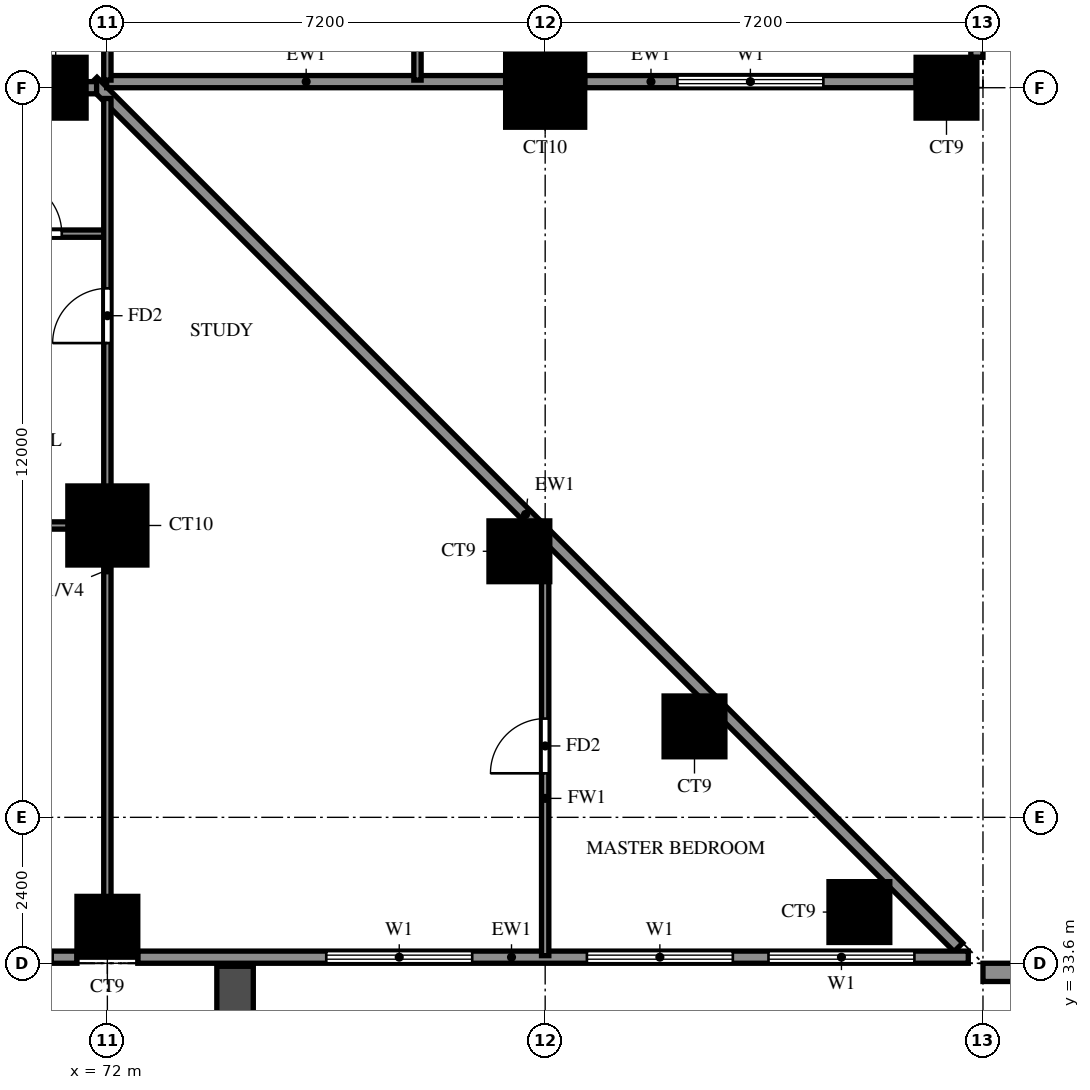
"""IFC4 building model, lengths in metres.
Left out: names, types, materials, properties, quantities, classifications, styles, units other than length and angle.
Written with IfcOpenShell. Run it as: python <this file> out.ifc"""

import sys

from ifc_helpers import new_model, si_unit, direction, frame, frame_2d, origin, origin_2d, place, context, subcontext, project, spatial, rectangle, extrude, source, transform, mapped, element, fill, save


model = new_model("IFC4")
c1 = context("Model", 3, precision=1e-05, world=origin(), true_north=direction((0.0, 1.0)))
c2 = subcontext(c1, "Body", "Model", "MODEL_VIEW")
j1 = project(units=[si_unit("LENGTHUNIT", "METRE"), si_unit("PLANEANGLEUNIT", "RADIAN")], contexts=[c1])
p1 = place(None, origin())
s1 = spatial("IfcSite", under=j1, at=p1, CompositionType="ELEMENT")
p2 = place(p1, origin())
s2 = spatial("IfcBuilding", under=s1, at=p2, CompositionType="ELEMENT")
p3 = place(p2, frame((0.0, 0.0, 69.0)))
s3 = spatial("IfcBuildingStorey", under=s2, at=p3, CompositionType="ELEMENT", Elevation=69.0)
m1 = source(origin(), c2, "Body", "SweptSolid", [
    extrude(rectangle(XDim=1.0, YDim=1.0, at=origin_2d()), origin(), (0.0, 0.0, 1.0), 3.18),
])
for number, where, z_axis, x_axis in (
    (1, (72.0, 34.2, 0.0), (0.0, 0.0, 1.0), (1.0, 0.0, 0.0)),
    (2, (84.367, 34.442, 0.0), (0.0, 0.0, 1.0), (1.0, 0.0, 0.0)),
    (3, (81.656, 37.496, 0.0), (0.0, 0.0, 1.0), (1.0, 0.0, 0.0)),
    (4, (78.776, 40.376, 0.0), (0.0, 0.0, 1.0), (1.0, 0.0, 0.0)),
):
    element("IfcColumn", number, at=place(p3, frame(where, z_axis=z_axis, x_axis=x_axis)), inside=s3, PredefinedType="COLUMN", context=c2, shape_type="MappedRepresentation", body=[
        mapped(m1, transform((0.0, 0.0, 0.0))),
    ])
m2 = source(origin(), c2, "Body", "SweptSolid", [
    extrude(rectangle(XDim=1.3, YDim=1.3, at=origin_2d()), origin(), (0.0, 0.0, 1.0), 3.18),
])
p4 = place(p3, frame((72.0, 40.8, 0.0), z_axis=(0.0, 0.0, 1.0), x_axis=(1.0, 0.0, 0.0)))
e5 = element("IfcColumn", 5, at=p4, inside=s3, PredefinedType="COLUMN", context=c2, shape_type="MappedRepresentation", body=[
    mapped(m2, transform((0.0, 0.0, 0.0))),
])
p5 = place(p3, frame((71.15, 48.0, 0.0), z_axis=(0.0, 0.0, 1.0), x_axis=(1.0, 0.0, 0.0)))
e6 = element("IfcColumn", 6, at=p5, inside=s3, PredefinedType="COLUMN", context=c2, shape_type="MappedRepresentation", body=[
    mapped(m1, transform((0.0, 0.0, 0.0))),
])
p6 = place(p3, frame((79.2, 48.0, 0.0), z_axis=(0.0, 0.0, 1.0), x_axis=(1.0, 0.0, 0.0)))
e7 = element("IfcColumn", 7, at=p6, inside=s3, PredefinedType="COLUMN", context=c2, shape_type="MappedRepresentation", body=[
    mapped(m2, transform((0.0, 0.0, 0.0))),
])
p7 = place(p3, frame((85.8, 48.0, 0.0), z_axis=(0.0, 0.0, 1.0), x_axis=(1.0, 0.0, 0.0)))
e8 = element("IfcColumn", 8, at=p7, inside=s3, PredefinedType="COLUMN", context=c2, shape_type="MappedRepresentation", body=[
    mapped(m1, transform((0.0, 0.0, 0.0))),
])
p8 = place(p3, frame((85.996, 33.863, 0.0), z_axis=(0.0, 0.0, 1.0), x_axis=(-0.707100718496, 0.707112843825, 0.0)))
e9 = element("IfcWall", 9, at=p8, inside=s3, PredefinedType="SOLIDWALL", context=c2, shape_type="SweptSolid", body=[
    extrude(rectangle(XDim=20.135, YDim=0.2, at=frame_2d((10.067, 0.0))), origin(), (0.0, 0.0, 1.0), 3.18),
])
p9 = place(p3, frame((71.989, 48.1, 0.0), z_axis=(0.0, 0.0, 1.0), x_axis=(1.0, 0.0, 0.0)))
e10 = element("IfcWall", 10, at=p9, inside=s3, PredefinedType="SOLIDWALL", context=c2, shape_type="SweptSolid", body=[
    extrude(rectangle(XDim=6.562, YDim=0.2, at=frame_2d((3.281, 0.0))), origin(), (0.0, 0.0, 1.0), 3.18),
])
p10 = place(p3, frame((79.85, 48.1, 0.0), z_axis=(0.0, 0.0, 1.0), x_axis=(1.0, 0.0, 0.0)))
e11 = element("IfcWall", 11, at=p10, inside=s3, PredefinedType="SOLIDWALL", context=c2, shape_type="SweptSolid", body=[
    extrude(rectangle(XDim=5.45, YDim=0.2, at=frame_2d((2.725, 0.0))), origin(), (0.0, 0.0, 1.0), 3.18),
])
p11 = place(p10, frame((1.525, 0.0, 0.6)))
e12 = element("IfcOpeningElement", 12, at=p11, cuts=e11, PredefinedType="OPENING", context=c2, shape_type="SweptSolid", body=[
    extrude(rectangle(XDim=2.4, YDim=2.4, at=frame_2d((1.2, 1.2))), frame((0.0, 0.11, 0.0), z_axis=(0.0, -1.0, 0.0), x_axis=(1.0, 0.0, 0.0)), (0.0, 0.0, 1.0), 0.22),
])
p12 = place(p3, frame((86.3, 48.5, 0.0), z_axis=(0.0, 0.0, 1.0), x_axis=(0.0, 1.0, 0.0)))
e13 = element("IfcWall", 13, at=p12, inside=s3, PredefinedType="SOLIDWALL", context=c2, shape_type="SweptSolid", body=[
    extrude(rectangle(XDim=6.2, YDim=0.2, at=frame_2d((3.1, 0.0))), origin(), (0.0, 0.0, 1.0), 3.18),
])
p13 = place(p12, frame((0.75, 0.0, 0.6)))
e14 = element("IfcOpeningElement", 14, at=p13, cuts=e13, PredefinedType="OPENING", context=c2, shape_type="SweptSolid", body=[
    extrude(rectangle(XDim=1.8, YDim=2.4, at=frame_2d((0.9, 1.2))), frame((0.0, 0.11, 0.0), z_axis=(0.0, -1.0, 0.0), x_axis=(1.0, 0.0, 0.0)), (0.0, 0.0, 1.0), 0.22),
])
p14 = place(p12, frame((3.25, 0.0, 0.6)))
e15 = element("IfcOpeningElement", 15, at=p14, cuts=e13, PredefinedType="OPENING", context=c2, shape_type="SweptSolid", body=[
    extrude(rectangle(XDim=0.9, YDim=2.4, at=frame_2d((0.45, 1.2))), frame((0.0, 0.11, 0.0), z_axis=(0.0, -1.0, 0.0), x_axis=(1.0, 0.0, 0.0)), (0.0, 0.0, 1.0), 0.22),
])
p15 = place(p12, frame((5.0, 0.0, 0.6)))
e16 = element("IfcOpeningElement", 16, at=p15, cuts=e13, PredefinedType="OPENING", context=c2, shape_type="SweptSolid", body=[
    extrude(rectangle(XDim=0.9, YDim=2.4, at=frame_2d((0.45, 1.2))), frame((0.0, 0.11, 0.0), z_axis=(0.0, -1.0, 0.0), x_axis=(1.0, 0.0, 0.0)), (0.0, 0.0, 1.0), 0.22),
])
p16 = place(p3, frame((65.3, 33.7, 0.0), z_axis=(0.0, 0.0, 1.0), x_axis=(1.0, 0.0, 0.0)))
e17 = element("IfcWall", 17, at=p16, inside=s3, PredefinedType="SOLIDWALL", context=c2, shape_type="SweptSolid", body=[
    extrude(rectangle(XDim=6.2, YDim=0.2, at=frame_2d((3.1, 0.0))), origin(), (0.0, 0.0, 1.0), 3.18),
])
p17 = place(p16, frame((4.0, 0.0, 0.0)))
e18 = element("IfcOpeningElement", 18, at=p17, cuts=e17, PredefinedType="OPENING", context=c2, shape_type="SweptSolid", body=[
    extrude(rectangle(XDim=1.8, YDim=2.4, at=frame_2d((0.9, 1.2))), frame((0.0, 0.11, 0.0), z_axis=(0.0, -1.0, 0.0), x_axis=(1.0, 0.0, 0.0)), (0.0, 0.0, 1.0), 0.22),
])
p18 = place(p16, frame((0.45, 0.0, 0.6)))
e19 = element("IfcOpeningElement", 19, at=p18, cuts=e17, PredefinedType="OPENING", context=c2, shape_type="SweptSolid", body=[
    extrude(rectangle(XDim=1.2, YDim=2.4, at=frame_2d((0.6, 1.2))), frame((0.0, 0.11, 0.0), z_axis=(0.0, -1.0, 0.0), x_axis=(1.0, 0.0, 0.0)), (0.0, 0.0, 1.0), 0.22),
])
p19 = place(p16, frame((2.65, 0.0, 0.6)))
e20 = element("IfcOpeningElement", 20, at=p19, cuts=e17, PredefinedType="OPENING", context=c2, shape_type="SweptSolid", body=[
    extrude(rectangle(XDim=0.9, YDim=2.4, at=frame_2d((0.45, 1.2))), frame((0.0, 0.11, 0.0), z_axis=(0.0, -1.0, 0.0), x_axis=(1.0, 0.0, 0.0)), (0.0, 0.0, 1.0), 0.22),
])
p20 = place(p3, frame((72.5, 33.7, 0.0), z_axis=(0.0, 0.0, 1.0), x_axis=(1.0, 0.0, 0.0)))
e21 = element("IfcWall", 21, at=p20, inside=s3, PredefinedType="SOLIDWALL", context=c2, shape_type="SweptSolid", body=[
    extrude(rectangle(XDim=13.659, YDim=0.2, at=frame_2d((6.829, 0.0))), origin(), (0.0, 0.0, 1.0), 3.18),
])
p21 = place(p20, frame((3.1, 0.0, 0.6)))
e22 = element("IfcOpeningElement", 22, at=p21, cuts=e21, PredefinedType="OPENING", context=c2, shape_type="SweptSolid", body=[
    extrude(rectangle(XDim=2.4, YDim=2.4, at=frame_2d((1.2, 1.2))), frame((0.0, 0.11, 0.0), z_axis=(0.0, -1.0, 0.0), x_axis=(1.0, 0.0, 0.0)), (0.0, 0.0, 1.0), 0.22),
])
p22 = place(p20, frame((7.386, 0.0, 0.6)))
e23 = element("IfcOpeningElement", 23, at=p22, cuts=e21, PredefinedType="OPENING", context=c2, shape_type="SweptSolid", body=[
    extrude(rectangle(XDim=2.4, YDim=2.4, at=frame_2d((1.2, 1.2))), frame((0.0, 0.11, 0.0), z_axis=(0.0, -1.0, 0.0), x_axis=(1.0, 0.0, 0.0)), (0.0, 0.0, 1.0), 0.22),
])
p23 = place(p20, frame((10.372, 0.0, 0.6)))
e24 = element("IfcOpeningElement", 24, at=p23, cuts=e21, PredefinedType="OPENING", context=c2, shape_type="SweptSolid", body=[
    extrude(rectangle(XDim=2.4, YDim=2.4, at=frame_2d((1.2, 1.2))), frame((0.0, 0.11, 0.0), z_axis=(0.0, -1.0, 0.0), x_axis=(1.0, 0.0, 0.0)), (0.0, 0.0, 1.0), 0.22),
])
p24 = place(p3, frame((86.4, 33.45, -0.32), z_axis=(0.0, 0.0, 1.0), x_axis=(1.0, 0.0, 0.0)))
e25 = element("IfcWall", 25, at=p24, inside=s3, PredefinedType="SOLIDWALL", context=c2, shape_type="SweptSolid", body=[
    extrude(rectangle(XDim=2.4, YDim=0.3, at=frame_2d((1.2, 0.0))), origin(), (0.0, 0.0, 1.0), 3.5),
])
p25 = place(p3, frame((74.1, 33.55, 0.0), z_axis=(0.0, 0.0, 1.0), x_axis=(0.0, -1.0, 0.0)))
e26 = element("IfcWall", 26, at=p25, inside=s3, PredefinedType="SOLIDWALL", context=c2, shape_type="SweptSolid", body=[
    extrude(rectangle(XDim=2.65, YDim=0.6, at=frame_2d((1.325, 0.0))), origin(), (0.0, 0.0, 1.0), 2.85),
])
p26 = place(p3, frame((67.2, 48.0, 0.0), z_axis=(0.0, 0.0, 1.0), x_axis=(1.0, 0.0, 0.0)))
e27 = element("IfcWall", 27, at=p26, inside=s3, PredefinedType="SOLIDWALL", context=c2, shape_type="SweptSolid", body=[
    extrude(rectangle(XDim=4.623, YDim=0.2, at=frame_2d((2.312, 0.0))), origin(), (0.0, 0.0, 1.0), 3.18),
])
p27 = place(p3, frame((60.0, 40.8, 0.0), z_axis=(0.0, 0.0, 1.0), x_axis=(1.0, 0.0, 0.0)))
e28 = element("IfcWall", 28, at=p27, inside=s3, PredefinedType="PARTITIONING", context=c2, shape_type="SweptSolid", body=[
    extrude(rectangle(XDim=12.0, YDim=0.12, at=frame_2d((6.0, 0.0))), origin(), (0.0, 0.0, 1.0), 3.18),
])
p28 = place(p27, frame((7.65, 0.0, 0.0)))
e29 = element("IfcOpeningElement", 29, at=p28, cuts=e28, PredefinedType="OPENING", context=c2, shape_type="SweptSolid", body=[
    extrude(rectangle(XDim=1.5, YDim=2.1, at=frame_2d((0.75, 1.05))), frame((0.0, 0.07, 0.0), z_axis=(0.0, -1.0, 0.0), x_axis=(1.0, 0.0, 0.0)), (0.0, 0.0, 1.0), 0.14),
])
p29 = place(p27, frame((1.95, 0.0, 0.0)))
e30 = element("IfcOpeningElement", 30, at=p29, cuts=e28, PredefinedType="OPENING", context=c2, shape_type="SweptSolid", body=[
    extrude(rectangle(XDim=0.9, YDim=2.1, at=frame_2d((0.45, 1.05))), frame((0.0, 0.07, 0.0), z_axis=(0.0, -1.0, 0.0), x_axis=(1.0, 0.0, 0.0)), (0.0, 0.0, 1.0), 0.14),
])
p30 = place(p3, frame((67.2, 45.6, 0.0), z_axis=(0.0, 0.0, 1.0), x_axis=(1.0, 0.0, 0.0)))
e31 = element("IfcWall", 31, at=p30, inside=s3, PredefinedType="PARTITIONING", context=c2, shape_type="SweptSolid", body=[
    extrude(rectangle(XDim=4.8, YDim=0.12, at=frame_2d((2.4, 0.0))), origin(), (0.0, 0.0, 1.0), 3.18),
])
p31 = place(p30, frame((3.15, 0.0, 0.0)))
e32 = element("IfcOpeningElement", 32, at=p31, cuts=e31, PredefinedType="OPENING", context=c2, shape_type="SweptSolid", body=[
    extrude(rectangle(XDim=0.9, YDim=2.1, at=frame_2d((0.45, 1.05))), frame((0.0, 0.07, 0.0), z_axis=(0.0, -1.0, 0.0), x_axis=(1.0, 0.0, 0.0)), (0.0, 0.0, 1.0), 0.14),
])
p32 = place(p3, frame((72.0, 33.725, 0.0), z_axis=(0.0, 0.0, 1.0), x_axis=(0.0, 1.0, 0.0)))
e33 = element("IfcWall", 33, at=p32, inside=s3, PredefinedType="PARTITIONING", context=c2, shape_type="SweptSolid", body=[
    extrude(rectangle(XDim=14.098, YDim=0.12, at=frame_2d((7.049, 0.0))), origin(), (0.0, 0.0, 1.0), 2.28),
])
p33 = place(p32, frame((10.075, 0.0, 0.0)))
e34 = element("IfcOpeningElement", 34, at=p33, cuts=e33, PredefinedType="OPENING", context=c2, shape_type="SweptSolid", body=[
    extrude(rectangle(XDim=0.9, YDim=2.1, at=frame_2d((0.45, 1.05))), frame((0.0, 0.07, 0.0), z_axis=(0.0, -1.0, 0.0), x_axis=(1.0, 0.0, 0.0)), (0.0, 0.0, 1.0), 0.14),
])
p34 = place(p3, frame((72.0, 48.125, 0.0), z_axis=(0.0, 0.0, 1.0), x_axis=(0.0, 1.0, 0.0)))
e35 = element("IfcWall", 35, at=p34, inside=s3, PredefinedType="PARTITIONING", context=c2, shape_type="SweptSolid", body=[
    extrude(rectangle(XDim=7.075, YDim=0.12, at=frame_2d((3.538, 0.0))), origin(), (0.0, 0.0, 1.0), 3.18),
])
p35 = place(p3, frame((77.1, 48.125, 0.0), z_axis=(0.0, 0.0, 1.0), x_axis=(0.0, 1.0, 0.0)))
e36 = element("IfcWall", 36, at=p35, inside=s3, PredefinedType="PARTITIONING", context=c2, shape_type="SweptSolid", body=[
    extrude(rectangle(XDim=7.075, YDim=0.12, at=frame_2d((3.538, 0.0))), origin(), (0.0, 0.0, 1.0), 3.18),
])
p36 = place(p35, frame((3.087, 0.0, 0.0)))
e37 = element("IfcOpeningElement", 37, at=p36, cuts=e36, PredefinedType="OPENING", context=c2, shape_type="SweptSolid", body=[
    extrude(rectangle(XDim=0.9, YDim=2.1, at=frame_2d((0.45, 1.05))), frame((0.0, 0.07, 0.0), z_axis=(0.0, -1.0, 0.0), x_axis=(1.0, 0.0, 0.0)), (0.0, 0.0, 1.0), 0.14),
])
p37 = place(p3, frame((79.2, 33.725, 0.0), z_axis=(0.0, 0.0, 1.0), x_axis=(0.0, 1.0, 0.0)))
e38 = element("IfcWall", 38, at=p37, inside=s3, PredefinedType="PARTITIONING", context=c2, shape_type="SweptSolid", body=[
    extrude(rectangle(XDim=6.898, YDim=0.12, at=frame_2d((3.449, 0.0))), origin(), (0.0, 0.0, 1.0), 3.18),
])
p38 = place(p37, frame((2.999, 0.0, 0.0)))
e39 = element("IfcOpeningElement", 39, at=p38, cuts=e38, PredefinedType="OPENING", context=c2, shape_type="SweptSolid", body=[
    extrude(rectangle(XDim=0.9, YDim=2.1, at=frame_2d((0.45, 1.05))), frame((0.0, 0.07, 0.0), z_axis=(0.0, -1.0, 0.0), x_axis=(1.0, 0.0, 0.0)), (0.0, 0.0, 1.0), 0.14),
])
p39 = place(p3, frame((79.2, 48.125, 0.0), z_axis=(0.0, 0.0, 1.0), x_axis=(0.0, 1.0, 0.0)))
e40 = element("IfcWall", 40, at=p39, inside=s3, PredefinedType="PARTITIONING", context=c2, shape_type="SweptSolid", body=[
    extrude(rectangle(XDim=21.475, YDim=0.12, at=frame_2d((10.738, 0.0))), origin(), (0.0, 0.0, 1.0), 3.18),
])
p40 = place(p39, frame((1.288, 0.0, 0.0)))
e41 = element("IfcOpeningElement", 41, at=p40, cuts=e40, PredefinedType="OPENING", context=c2, shape_type="SweptSolid", body=[
    extrude(rectangle(XDim=0.9, YDim=2.1, at=frame_2d((0.45, 1.05))), frame((0.0, 0.07, 0.0), z_axis=(0.0, -1.0, 0.0), x_axis=(1.0, 0.0, 0.0)), (0.0, 0.0, 1.0), 0.14),
])
p41 = place(p39, frame((4.825, 0.0, 0.0)))
e42 = element("IfcOpeningElement", 42, at=p41, cuts=e40, PredefinedType="OPENING", context=c2, shape_type="SweptSolid", body=[
    extrude(rectangle(XDim=0.9, YDim=2.1, at=frame_2d((0.45, 1.05))), frame((0.0, 0.07, 0.0), z_axis=(0.0, -1.0, 0.0), x_axis=(1.0, 0.0, 0.0)), (0.0, 0.0, 1.0), 0.14),
])
p42 = place(p39, frame((9.925, 0.0, 0.0)))
e43 = element("IfcOpeningElement", 43, at=p42, cuts=e40, PredefinedType="OPENING", context=c2, shape_type="SweptSolid", body=[
    extrude(rectangle(XDim=1.5, YDim=2.1, at=frame_2d((0.75, 1.05))), frame((0.0, 0.07, 0.0), z_axis=(0.0, -1.0, 0.0), x_axis=(1.0, 0.0, 0.0)), (0.0, 0.0, 1.0), 0.14),
])
p43 = place(p39, frame((15.625, 0.0, 0.0)))
e44 = element("IfcOpeningElement", 44, at=p43, cuts=e40, PredefinedType="OPENING", context=c2, shape_type="SweptSolid", body=[
    extrude(rectangle(XDim=0.9, YDim=2.1, at=frame_2d((0.45, 1.05))), frame((0.0, 0.07, 0.0), z_axis=(0.0, -1.0, 0.0), x_axis=(1.0, 0.0, 0.0)), (0.0, 0.0, 1.0), 0.14),
])
p44 = place(p39, frame((19.225, 0.0, 0.0)))
e45 = element("IfcOpeningElement", 45, at=p44, cuts=e40, PredefinedType="OPENING", context=c2, shape_type="SweptSolid", body=[
    extrude(rectangle(XDim=0.9, YDim=2.1, at=frame_2d((0.45, 1.05))), frame((0.0, 0.07, 0.0), z_axis=(0.0, -1.0, 0.0), x_axis=(1.0, 0.0, 0.0)), (0.0, 0.0, 1.0), 0.14),
])
p45 = place(p11, origin())
e46 = element("IfcWindow", 46, at=p45, inside=s3, PartitioningType="DOUBLE_PANEL_VERTICAL", PredefinedType="WINDOW", context=c2, shape_type="SweptSolid", body=[
    extrude(rectangle(XDim=2.4, YDim=2.4, at=frame_2d((1.2, 1.2))), frame((0.0, 0.03, 0.0), z_axis=(0.0, -1.0, 0.0), x_axis=(1.0, 0.0, 0.0)), (0.0, 0.0, 1.0), 0.06),
])
fill(e12, e46)
p46 = place(p21, origin())
e47 = element("IfcWindow", 47, at=p46, inside=s3, PartitioningType="DOUBLE_PANEL_VERTICAL", PredefinedType="WINDOW", context=c2, shape_type="SweptSolid", body=[
    extrude(rectangle(XDim=2.4, YDim=2.4, at=frame_2d((1.2, 1.2))), frame((0.0, 0.03, 0.0), z_axis=(0.0, -1.0, 0.0), x_axis=(1.0, 0.0, 0.0)), (0.0, 0.0, 1.0), 0.06),
])
fill(e22, e47)
p47 = place(p22, origin())
e48 = element("IfcWindow", 48, at=p47, inside=s3, PartitioningType="DOUBLE_PANEL_VERTICAL", PredefinedType="WINDOW", context=c2, shape_type="SweptSolid", body=[
    extrude(rectangle(XDim=2.4, YDim=2.4, at=frame_2d((1.2, 1.2))), frame((0.0, 0.03, 0.0), z_axis=(0.0, -1.0, 0.0), x_axis=(1.0, 0.0, 0.0)), (0.0, 0.0, 1.0), 0.06),
])
fill(e23, e48)
p48 = place(p23, origin())
e49 = element("IfcWindow", 49, at=p48, inside=s3, PartitioningType="DOUBLE_PANEL_VERTICAL", PredefinedType="WINDOW", context=c2, shape_type="SweptSolid", body=[
    extrude(rectangle(XDim=2.4, YDim=2.4, at=frame_2d((1.2, 1.2))), frame((0.0, 0.03, 0.0), z_axis=(0.0, -1.0, 0.0), x_axis=(1.0, 0.0, 0.0)), (0.0, 0.0, 1.0), 0.06),
])
fill(e24, e49)
p49 = place(p31, origin())
e50 = element("IfcDoor", 50, at=p49, inside=s3, OperationType="SINGLE_SWING_RIGHT", PredefinedType="DOOR", context=c2, shape_type="SweptSolid", body=[
    extrude(rectangle(XDim=0.9, YDim=2.1, at=frame_2d((0.45, 1.05))), frame((0.0, 0.025, 0.0), z_axis=(0.0, -1.0, 0.0), x_axis=(1.0, 0.0, 0.0)), (0.0, 0.0, 1.0), 0.05),
])
fill(e32, e50)
p50 = place(p33, origin())
e51 = element("IfcDoor", 51, at=p50, inside=s3, OperationType="SINGLE_SWING_LEFT", PredefinedType="DOOR", context=c2, shape_type="SweptSolid", body=[
    extrude(rectangle(XDim=0.9, YDim=2.1, at=frame_2d((0.45, 1.05))), frame((0.0, 0.025, 0.0), z_axis=(0.0, -1.0, 0.0), x_axis=(1.0, 0.0, 0.0)), (0.0, 0.0, 1.0), 0.05),
])
fill(e34, e51)
p51 = place(p38, origin())
e52 = element("IfcDoor", 52, at=p51, inside=s3, OperationType="SINGLE_SWING_LEFT", PredefinedType="DOOR", context=c2, shape_type="SweptSolid", body=[
    extrude(rectangle(XDim=0.9, YDim=2.1, at=frame_2d((0.45, 1.05))), frame((0.0, 0.025, 0.0), z_axis=(0.0, -1.0, 0.0), x_axis=(1.0, 0.0, 0.0)), (0.0, 0.0, 1.0), 0.05),
])
fill(e39, e52)
save(model, sys.argv[1])
